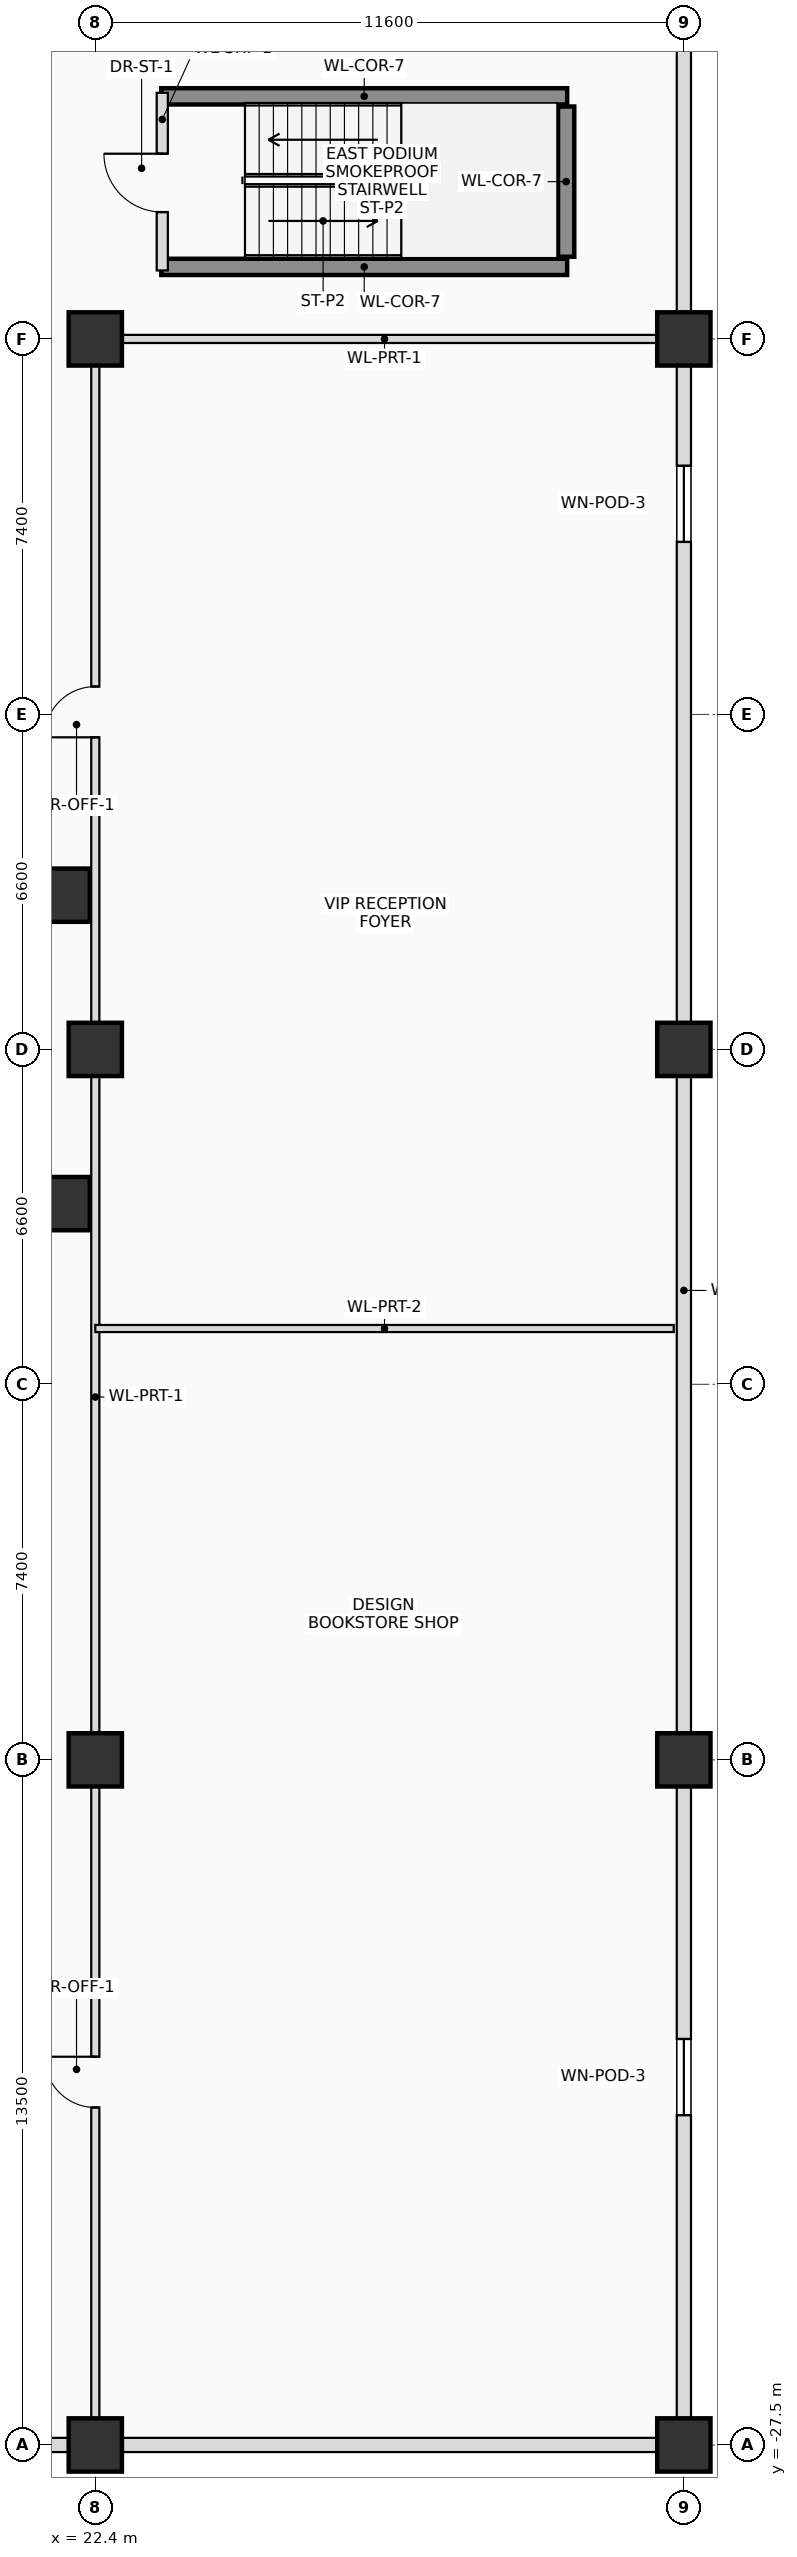
"""IFC4 building model, lengths in metres.
Left out: names, types, materials, properties, quantities, classifications, styles, units other than length and angle.
Written with IfcOpenShell. Run it as: python <this file> out.ifc"""

import sys

from ifc_helpers import new_model, si_unit, direction, frame, frame_2d, origin, origin_2d, place, context, subcontext, project, spatial, rectangle, extrude, source, transform, mapped, element, fill, save


model = new_model("IFC4")
c1 = context("Model", 3, precision=1e-05, world=origin(), true_north=direction((0.0, 1.0)))
c2 = subcontext(c1, "Body", "Model", "MODEL_VIEW")
j1 = project(units=[si_unit("LENGTHUNIT", "METRE"), si_unit("PLANEANGLEUNIT", "RADIAN")], contexts=[c1])
p1 = place(None, origin())
s1 = spatial("IfcSite", under=j1, at=p1, CompositionType="ELEMENT")
p2 = place(p1, origin())
s2 = spatial("IfcBuilding", under=s1, at=p2, CompositionType="ELEMENT")
p3 = place(p2, frame((0.0, 0.0, 8.4)))
s3 = spatial("IfcBuildingStorey", under=s2, at=p3, CompositionType="ELEMENT", Elevation=8.4)
for number, where, z_axis, x_axis in (
    (1, (23.7, 18.78, 0.0), (0.0, 0.0, 1.0), (1.0, 0.0, 0.0)),
    (2, (23.7, 15.42, 0.0), (0.0, 0.0, 1.0), (1.0, 0.0, 0.0)),
):
    element("IfcWall", number, at=place(p3, frame(where, z_axis=z_axis, x_axis=x_axis)), inside=s3, PredefinedType="SHEAR", context=c2, shape_type="SweptSolid", body=[
        extrude(rectangle(XDim=8.0, YDim=0.32, at=frame_2d((4.0, 0.0))), origin(), (0.0, 0.0, 1.0), 3.9),
    ])
p4 = place(p3, frame((31.68, 15.62, 0.0), z_axis=(0.0, 0.0, 1.0), x_axis=(0.0, 1.0, 0.0)))
e3 = element("IfcWall", 3, at=p4, inside=s3, PredefinedType="SHEAR", context=c2, shape_type="SweptSolid", body=[
    extrude(rectangle(XDim=2.96, YDim=0.32, at=frame_2d((1.48, 0.0))), origin(), (0.0, 0.0, 1.0), 3.9),
])
m1 = source(origin(), c2, "Body", "SweptSolid", [
    extrude(rectangle(XDim=1.05, YDim=1.05, at=origin_2d()), origin(), (0.0, 0.0, 1.0), 3.9),
])
for number, where, z_axis, x_axis in (
    (4, (22.4, -27.5, 0.0), (0.0, 0.0, 1.0), (1.0, 0.0, 0.0)),
    (5, (34.0, -27.5, 0.0), (0.0, 0.0, 1.0), (1.0, 0.0, 0.0)),
    (6, (22.4, -14.0, 0.0), (0.0, 0.0, 1.0), (1.0, 0.0, 0.0)),
    (7, (34.0, -14.0, 0.0), (0.0, 0.0, 1.0), (1.0, 0.0, 0.0)),
    (8, (22.4, 0.0, 0.0), (0.0, 0.0, 1.0), (1.0, 0.0, 0.0)),
    (9, (34.0, 0.0, 0.0), (0.0, 0.0, 1.0), (1.0, 0.0, 0.0)),
    (10, (22.4, 14.0, 0.0), (0.0, 0.0, 1.0), (1.0, 0.0, 0.0)),
    (11, (34.0, 14.0, 0.0), (0.0, 0.0, 1.0), (1.0, 0.0, 0.0)),
    (12, (21.766, -3.039, 0.0), (0.0, 0.0, 1.0), (1.0, 0.0, 0.0)),
    (13, (21.766, 3.039, 0.0), (0.0, 0.0, 1.0), (1.0, 0.0, 0.0)),
):
    element("IfcColumn", number, at=place(p3, frame(where, z_axis=z_axis, x_axis=x_axis)), inside=s3, PredefinedType="COLUMN", context=c2, shape_type="MappedRepresentation", body=[
        mapped(m1, transform((0.0, 0.0, 0.0), scale=1.0)),
    ])
p5 = place(p3, frame((34.0, 29.5, 0.0), z_axis=(0.0, 0.0, 1.0), x_axis=(0.0, -1.0, 0.0)))
e14 = element("IfcWall", 14, at=p5, inside=s3, PredefinedType="SOLIDWALL", context=c2, shape_type="SweptSolid", body=[
    extrude(rectangle(XDim=57.0, YDim=0.28, at=frame_2d((28.5, 0.0))), origin(), (0.0, 0.0, 1.0), 2.65),
])
p6 = place(p5, frame((18.0, 0.0, 0.65)))
e15 = element("IfcOpeningElement", 15, at=p6, cuts=e14, PredefinedType="OPENING", context=c2, shape_type="SweptSolid", body=[
    extrude(rectangle(XDim=1.5, YDim=1.8, at=frame_2d((0.75, 0.9))), frame((0.0, 0.15, 0.0), z_axis=(0.0, -1.0, 0.0), x_axis=(1.0, 0.0, 0.0)), (0.0, 0.0, 1.0), 0.3),
])
p7 = place(p5, frame((49.0, 0.0, 0.65)))
e16 = element("IfcOpeningElement", 16, at=p7, cuts=e14, PredefinedType="OPENING", context=c2, shape_type="SweptSolid", body=[
    extrude(rectangle(XDim=1.5, YDim=1.8, at=frame_2d((0.75, 0.9))), frame((0.0, 0.15, 0.0), z_axis=(0.0, -1.0, 0.0), x_axis=(1.0, 0.0, 0.0)), (0.0, 0.0, 1.0), 0.3),
])
p8 = place(p3, frame((34.0, -27.5, 0.0), z_axis=(0.0, 0.0, 1.0), x_axis=(-1.0, 0.0, 0.0)))
e17 = element("IfcWall", 17, at=p8, inside=s3, PredefinedType="SOLIDWALL", context=c2, shape_type="SweptSolid", body=[
    extrude(rectangle(XDim=68.0, YDim=0.28, at=frame_2d((34.0, 0.0))), origin(), (0.0, 0.0, 1.0), 2.65),
])
p9 = place(p8, frame((16.0, 0.0, 0.65)))
e18 = element("IfcOpeningElement", 18, at=p9, cuts=e17, PredefinedType="OPENING", context=c2, shape_type="SweptSolid", body=[
    extrude(rectangle(XDim=1.5, YDim=1.8, at=frame_2d((0.75, 0.9))), frame((0.0, 0.15, 0.0), z_axis=(0.0, -1.0, 0.0), x_axis=(1.0, 0.0, 0.0)), (0.0, 0.0, 1.0), 0.3),
])
p10 = place(p8, frame((49.0, 0.0, 0.65)))
e19 = element("IfcOpeningElement", 19, at=p10, cuts=e17, PredefinedType="OPENING", context=c2, shape_type="SweptSolid", body=[
    extrude(rectangle(XDim=1.5, YDim=1.8, at=frame_2d((0.75, 0.9))), frame((0.0, 0.15, 0.0), z_axis=(0.0, -1.0, 0.0), x_axis=(1.0, 0.0, 0.0)), (0.0, 0.0, 1.0), 0.3),
])
p11 = place(p3, frame((23.72, 15.35, 0.0), z_axis=(0.0, 0.0, 1.0), x_axis=(0.0, 1.0, 0.0)))
e20 = element("IfcWall", 20, at=p11, inside=s3, PredefinedType="PLUMBINGWALL", context=c2, shape_type="SweptSolid", body=[
    extrude(rectangle(XDim=3.5, YDim=0.22, at=frame_2d((1.75, 0.0))), origin(), (0.0, 0.0, 1.0), 3.57),
])
p12 = place(p11, frame((1.15, 0.0, 0.0)))
e21 = element("IfcOpeningElement", 21, at=p12, cuts=e20, PredefinedType="OPENING", context=c2, shape_type="SweptSolid", body=[
    extrude(rectangle(XDim=1.15, YDim=2.15, at=frame_2d((0.575, 1.075))), frame((0.0, 0.12, 0.0), z_axis=(0.0, -1.0, 0.0), x_axis=(1.0, 0.0, 0.0)), (0.0, 0.0, 1.0), 0.24),
])
p13 = place(p3, frame((22.4, -27.35, 0.0), z_axis=(0.0, 0.0, 1.0), x_axis=(0.0, 1.0, 0.0)))
e22 = element("IfcWall", 22, at=p13, inside=s3, PredefinedType="PARTITIONING", context=c2, shape_type="SweptSolid", body=[
    extrude(rectangle(XDim=41.35, YDim=0.16, at=frame_2d((20.675, 0.0))), origin(), (0.0, 0.0, 1.0), 2.775),
])
p14 = place(p13, frame((6.5, 0.0, 0.0)))
e23 = element("IfcOpeningElement", 23, at=p14, cuts=e22, PredefinedType="OPENING", context=c2, shape_type="SweptSolid", body=[
    extrude(rectangle(XDim=1.0, YDim=2.25, at=frame_2d((0.5, 1.125))), frame((0.0, 0.09, 0.0), z_axis=(0.0, -1.0, 0.0), x_axis=(1.0, 0.0, 0.0)), (0.0, 0.0, 1.0), 0.18),
])
p15 = place(p13, frame((33.5, 0.0, 0.0)))
e24 = element("IfcOpeningElement", 24, at=p15, cuts=e22, PredefinedType="OPENING", context=c2, shape_type="SweptSolid", body=[
    extrude(rectangle(XDim=1.0, YDim=2.25, at=frame_2d((0.5, 1.125))), frame((0.0, 0.09, 0.0), z_axis=(0.0, -1.0, 0.0), x_axis=(1.0, 0.0, 0.0)), (0.0, 0.0, 1.0), 0.18),
])
p16 = place(p3, frame((22.4, 14.0, 0.0), z_axis=(0.0, 0.0, 1.0), x_axis=(1.0, 0.0, 0.0)))
e25 = element("IfcWall", 25, at=p16, inside=s3, PredefinedType="PARTITIONING", context=c2, shape_type="SweptSolid", body=[
    extrude(rectangle(XDim=11.4, YDim=0.16, at=frame_2d((5.7, 0.0))), origin(), (0.0, 0.0, 1.0), 2.775),
])
p17 = place(p3, frame((22.4, -5.5, 0.0), z_axis=(0.0, 0.0, 1.0), x_axis=(1.0, 0.0, 0.0)))
e26 = element("IfcWall", 26, at=p17, inside=s3, PredefinedType="PARTITIONING", context=c2, shape_type="SweptSolid", body=[
    extrude(rectangle(XDim=11.4, YDim=0.14, at=frame_2d((5.7, 0.0))), origin(), (0.0, 0.0, 1.0), 2.775),
])
p18 = place(p6, origin())
e27 = element("IfcWindow", 27, at=p18, inside=s3, PartitioningType="SINGLE_PANEL", PredefinedType="WINDOW", context=c2, shape_type="SweptSolid", body=[
    extrude(rectangle(XDim=1.5, YDim=1.8, at=frame_2d((0.75, 0.9))), frame((0.0, 0.03, 0.0), z_axis=(0.0, -1.0, 0.0), x_axis=(1.0, 0.0, 0.0)), (0.0, 0.0, 1.0), 0.06),
])
fill(e15, e27)
p19 = place(p7, origin())
e28 = element("IfcWindow", 28, at=p19, inside=s3, PartitioningType="SINGLE_PANEL", PredefinedType="WINDOW", context=c2, shape_type="SweptSolid", body=[
    extrude(rectangle(XDim=1.5, YDim=1.8, at=frame_2d((0.75, 0.9))), frame((0.0, 0.03, 0.0), z_axis=(0.0, -1.0, 0.0), x_axis=(1.0, 0.0, 0.0)), (0.0, 0.0, 1.0), 0.06),
])
fill(e16, e28)
p20 = place(p12, origin())
e29 = element("IfcDoor", 29, at=p20, inside=s3, OperationType="SINGLE_SWING_RIGHT", PredefinedType="DOOR", context=c2, shape_type="SweptSolid", body=[
    extrude(rectangle(XDim=1.15, YDim=2.15, at=frame_2d((0.575, 1.075))), frame((0.0, 0.025, 0.0), z_axis=(0.0, -1.0, 0.0), x_axis=(1.0, 0.0, 0.0)), (0.0, 0.0, 1.0), 0.05),
])
fill(e21, e29)
p21 = place(p14, origin())
e30 = element("IfcDoor", 30, at=p21, inside=s3, OperationType="SINGLE_SWING_RIGHT", PredefinedType="DOOR", context=c2, shape_type="SweptSolid", body=[
    extrude(rectangle(XDim=1.0, YDim=2.25, at=frame_2d((0.5, 1.125))), frame((0.0, 0.025, 0.0), z_axis=(0.0, -1.0, 0.0), x_axis=(1.0, 0.0, 0.0)), (0.0, 0.0, 1.0), 0.05),
])
fill(e23, e30)
p22 = place(p15, origin())
e31 = element("IfcDoor", 31, at=p22, inside=s3, OperationType="SINGLE_SWING_LEFT", PredefinedType="DOOR", context=c2, shape_type="SweptSolid", body=[
    extrude(rectangle(XDim=1.0, YDim=2.25, at=frame_2d((0.5, 1.125))), frame((0.0, 0.025, 0.0), z_axis=(0.0, -1.0, 0.0), x_axis=(1.0, 0.0, 0.0)), (0.0, 0.0, 1.0), 0.05),
])
fill(e24, e31)
save(model, sys.argv[1])
